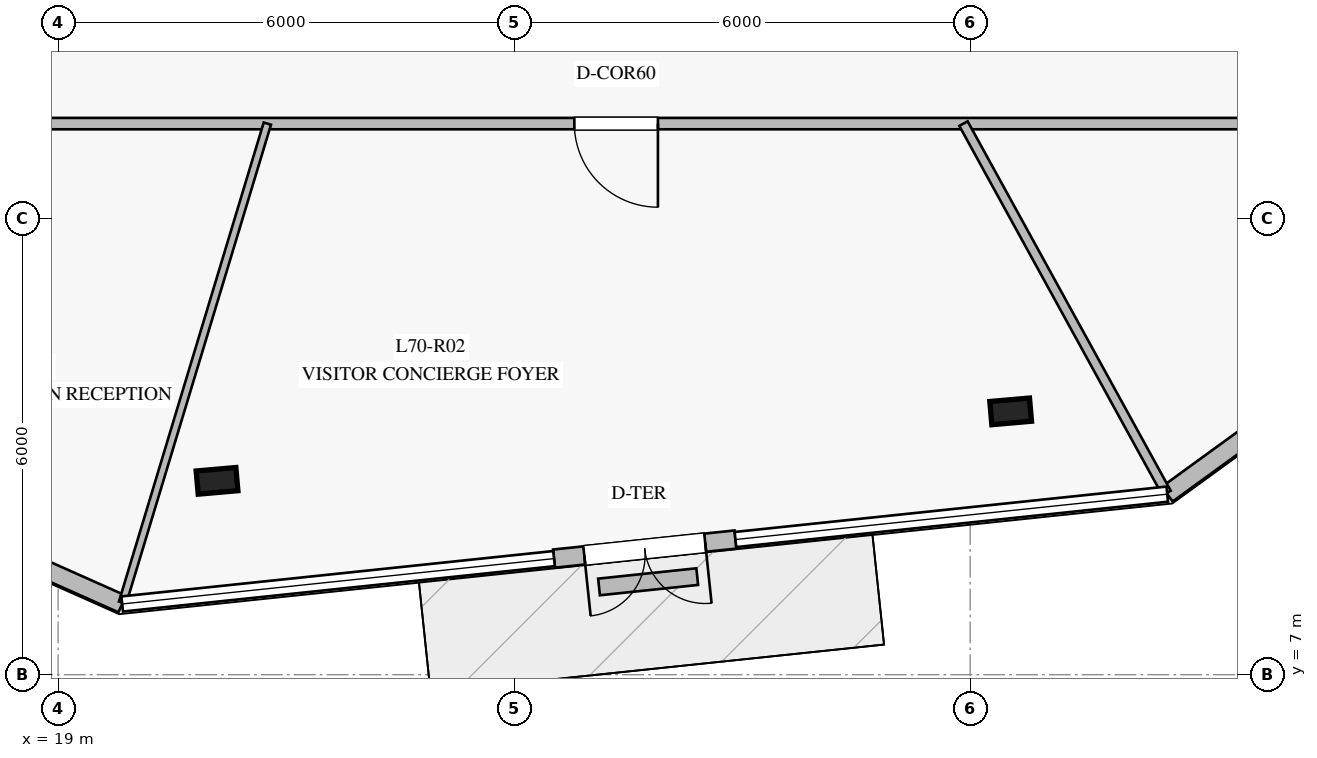
"""IFC4 building model, lengths in metres.
Left out: names, types, materials, properties, quantities, classifications, styles, units other than length and angle.
Written with IfcOpenShell. Run it as: python <this file> out.ifc"""

import sys

from ifc_helpers import new_model, si_unit, direction, frame, frame_2d, origin, origin_2d, place, context, subcontext, project, spatial, rectangle, i_section, extrude, element, fill, save


model = new_model("IFC4")
c1 = context("Model", 3, precision=1e-05, world=origin(), true_north=direction((0.0, 1.0)))
c2 = subcontext(c1, "Body", "Model", "MODEL_VIEW")
j1 = project(units=[si_unit("LENGTHUNIT", "METRE"), si_unit("PLANEANGLEUNIT", "RADIAN")], contexts=[c1])
p1 = place(None, origin())
s1 = spatial("IfcSite", under=j1, at=p1, CompositionType="ELEMENT")
p2 = place(p1, origin())
s2 = spatial("IfcBuilding", under=s1, at=p2, CompositionType="ELEMENT")
p3 = place(p2, frame((0.0, 0.0, 290.2)))
s3 = spatial("IfcBuildingStorey", under=s2, at=p3, CompositionType="ELEMENT", Elevation=290.2)
for number, where, z_axis, x_axis in (
    (1, (21.091, 9.55, 0.0), (0.0, 0.0, 1.0), (0.996, 0.087, 0.0)),
    (2, (31.533, 10.464, 0.0), (0.0, 0.0, 1.0), (0.996, 0.087, 0.0)),
):
    element("IfcColumn", number, at=place(p3, frame(where, z_axis=z_axis, x_axis=x_axis)), inside=s3, PredefinedType="COLUMN", context=c2, shape_type="SweptSolid", body=[
        extrude(i_section(OverallWidth=0.306, OverallDepth=0.524, WebThickness=0.021, FlangeThickness=0.04, at=origin_2d()), origin(), (0.0, 0.0, 1.0), 4.0),
    ])
p4 = place(p3, frame((15.765, 9.746, 0.0), z_axis=(0.0, 0.0, 1.0), x_axis=(0.913506843716, -0.406823360297, 0.0)))
e3 = element("IfcWall", 3, at=p4, inside=s3, PredefinedType="STANDARD", context=c2, shape_type="SweptSolid", body=[
    extrude(rectangle(XDim=4.464, YDim=0.24, at=frame_2d((2.232, 0.0))), origin(), (0.0, 0.0, 1.0), 3.78),
])
p5 = place(p3, frame((25.525, 8.527, 0.0), z_axis=(0.0, 0.0, 1.0), x_axis=(0.994518820344, 0.104557716027, 0.0)))
e4 = element("IfcWall", 4, at=p5, inside=s3, PredefinedType="STANDARD", context=c2, shape_type="SweptSolid", body=[
    extrude(rectangle(XDim=2.4, YDim=0.24, at=frame_2d((1.2, 0.0))), origin(), (0.0, 0.0, 1.0), 3.78),
])
p6 = place(p5, frame((0.4, 0.0, 0.0)))
e5 = element("IfcOpeningElement", 5, at=p6, cuts=e4, PredefinedType="OPENING", context=c2, shape_type="SweptSolid", body=[
    extrude(rectangle(XDim=1.6, YDim=2.25, at=frame_2d((0.8, 1.125))), frame((0.0, 0.13, 0.0), z_axis=(0.0, -1.0, 0.0), x_axis=(1.0, 0.0, 0.0)), (0.0, 0.0, 1.0), 0.26),
])
p7 = place(p3, frame((33.593, 9.375, 0.0), z_axis=(0.0, 0.0, 1.0), x_axis=(0.809048111957, 0.587742420231, 0.0)))
e6 = element("IfcWall", 6, at=p7, inside=s3, PredefinedType="STANDARD", context=c2, shape_type="SweptSolid", body=[
    extrude(rectangle(XDim=4.465, YDim=0.24, at=frame_2d((2.232, 0.0))), origin(), (0.0, 0.0, 1.0), 3.78),
])
p8 = place(p3, frame((26.117, 8.154, 0.0), z_axis=(0.0, 0.0, 1.0), x_axis=(0.994506482607, 0.104675002043, 0.0)))
e7 = element("IfcWall", 7, at=p8, inside=s3, PredefinedType="USERDEFINED", context=c2, shape_type="SweptSolid", body=[
    extrude(rectangle(XDim=1.299, YDim=0.22, at=frame_2d((0.649, 0.0))), origin(), (0.0, 0.0, 1.0), 0.4),
])
p9 = place(p3, frame((36.35, 14.25, 0.0), z_axis=(0.0, 0.0, 1.0), x_axis=(-1.0, 0.0, 0.0)))
e8 = element("IfcWall", 8, at=p9, inside=s3, PredefinedType="PARTITIONING", context=c2, shape_type="SweptSolid", body=[
    extrude(rectangle(XDim=22.7, YDim=0.15, at=frame_2d((11.35, 0.0))), origin(), (0.0, 0.0, 1.0), 3.28),
])
p10 = place(p9, frame((17.926, 0.0, 0.0)))
e9 = element("IfcOpeningElement", 9, at=p10, cuts=e8, PredefinedType="OPENING", context=c2, shape_type="SweptSolid", body=[
    extrude(rectangle(XDim=1.1, YDim=2.2, at=frame_2d((0.55, 1.1))), frame((0.0, 0.085, 0.0), z_axis=(0.0, -1.0, 0.0), x_axis=(1.0, 0.0, 0.0)), (0.0, 0.0, 1.0), 0.17),
])
p11 = place(p9, frame((9.458, 0.0, 0.0)))
e10 = element("IfcOpeningElement", 10, at=p11, cuts=e8, PredefinedType="OPENING", context=c2, shape_type="SweptSolid", body=[
    extrude(rectangle(XDim=1.1, YDim=2.2, at=frame_2d((0.55, 1.1))), frame((0.0, 0.085, 0.0), z_axis=(0.0, -1.0, 0.0), x_axis=(1.0, 0.0, 0.0)), (0.0, 0.0, 1.0), 0.17),
])
p12 = place(p3, frame((21.753, 14.25, 0.0), z_axis=(0.0, 0.0, 1.0), x_axis=(-0.289316815041, -0.957233399195, 0.0)))
e11 = element("IfcWall", 11, at=p12, inside=s3, PredefinedType="MOVABLE", context=c2, shape_type="SweptSolid", body=[
    extrude(rectangle(XDim=6.584, YDim=0.1, at=frame_2d((3.292, 0.0))), origin(), (0.0, 0.0, 1.0), 3.28),
])
p13 = place(p3, frame((30.912, 14.25, 0.0), z_axis=(0.0, 0.0, 1.0), x_axis=(0.481754828114, -0.876306045619, 0.0)))
e12 = element("IfcWall", 12, at=p13, inside=s3, PredefinedType="PARTITIONING", context=c2, shape_type="SweptSolid", body=[
    extrude(rectangle(XDim=5.546, YDim=0.125, at=frame_2d((2.773, 0.0))), origin(), (0.0, 0.0, 1.0), 3.28),
])
p14 = place(p6, frame((1.6, 0.0, 0.0), z_axis=(0.0, 0.0, 1.0), x_axis=(-1.0, 0.0, 0.0)))
e13 = element("IfcDoor", 13, at=p14, inside=s3, OperationType="DOUBLE_DOOR_SINGLE_SWING", PredefinedType="DOOR", context=c2, shape_type="SweptSolid", body=[
    extrude(rectangle(XDim=1.6, YDim=2.25, at=frame_2d((0.8, 1.125))), frame((0.0, 0.025, 0.0), z_axis=(0.0, -1.0, 0.0), x_axis=(1.0, 0.0, 0.0)), (0.0, 0.0, 1.0), 0.05),
])
fill(e5, e13)
p15 = place(p11, origin())
e14 = element("IfcDoor", 14, at=p15, inside=s3, OperationType="SINGLE_SWING_LEFT", PredefinedType="DOOR", context=c2, shape_type="SweptSolid", body=[
    extrude(rectangle(XDim=1.1, YDim=2.2, at=frame_2d((0.55, 1.1))), frame((0.0, 0.025, 0.0), z_axis=(0.0, -1.0, 0.0), x_axis=(1.0, 0.0, 0.0)), (0.0, 0.0, 1.0), 0.05),
])
fill(e10, e14)
save(model, sys.argv[1])
